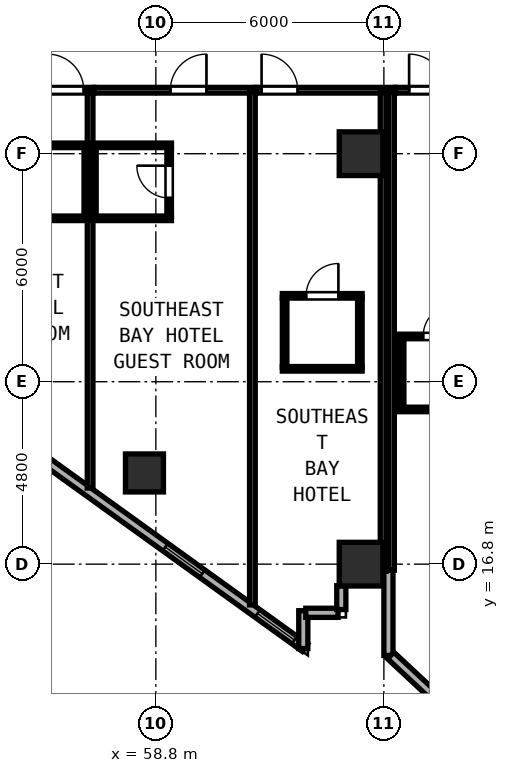
"""IFC4 building model, lengths in metres.
Left out: names, types, materials, properties, quantities, classifications, styles, units other than length and angle.
Written with IfcOpenShell. Run it as: python <this file> out.ifc"""

import sys

from ifc_helpers import new_model, si_unit, direction, frame, frame_2d, origin, origin_2d, place, context, subcontext, project, spatial, rectangle, hollow_rectangle, extrude, element, fill, save


model = new_model("IFC4")
c1 = context("Model", 3, precision=1e-05, world=origin(), true_north=direction((0.0, 1.0)))
c2 = subcontext(c1, "Body", "Model", "MODEL_VIEW")
j1 = project(units=[si_unit("LENGTHUNIT", "METRE"), si_unit("PLANEANGLEUNIT", "RADIAN")], contexts=[c1])
p1 = place(None, origin())
s1 = spatial("IfcSite", under=j1, at=p1, CompositionType="ELEMENT")
p2 = place(p1, origin())
s2 = spatial("IfcBuilding", under=s1, at=p2, CompositionType="ELEMENT")
p3 = place(p2, frame((0.0, 0.0, 62.8)))
s3 = spatial("IfcBuildingStorey", under=s2, at=p3, CompositionType="ELEMENT", Elevation=62.8)
for number, where, z_axis, x_axis in (
    (1, (64.2, 16.8, 0.0), (0.0, 0.0, 1.0), (1.0, 0.0, 0.0)),
    (2, (64.2, 27.6, 0.0), (0.0, 0.0, 1.0), (1.0, 0.0, 0.0)),
):
    element("IfcColumn", number, at=place(p3, frame(where, z_axis=z_axis, x_axis=x_axis)), inside=s3, PredefinedType="COLUMN", context=c2, shape_type="SweptSolid", body=[
        extrude(hollow_rectangle(XDim=1.15, YDim=1.15, WallThickness=0.042, at=origin_2d()), origin(), (0.0, 0.0, 1.0), 3.8),
    ])
p4 = place(p3, frame((58.5, 19.2, 0.0), z_axis=(0.0, 0.0, 1.0), x_axis=(1.0, 0.0, 0.0)))
e3 = element("IfcColumn", 3, at=p4, inside=s3, PredefinedType="COLUMN", context=c2, shape_type="SweptSolid", body=[
    extrude(hollow_rectangle(XDim=1.0, YDim=1.0, WallThickness=0.038, at=origin_2d()), origin(), (0.0, 0.0, 1.0), 3.8),
])
p5 = place(p3, frame((53.367, 21.34, 0.0), z_axis=(0.0, 0.0, 1.0), x_axis=(0.811543176492, -0.58429245476, 0.0)))
e4 = element("IfcWall", 4, at=p5, inside=s3, PredefinedType="SOLIDWALL", context=c2, shape_type="SweptSolid", body=[
    extrude(rectangle(XDim=11.531, YDim=0.24, at=frame_2d((5.765, 0.0))), origin(), (0.0, 0.0, 1.0), 3.097),
])
p6 = place(p5, frame((1.6, 0.0, 0.85)))
e5 = element("IfcOpeningElement", 5, at=p6, cuts=e4, PredefinedType="OPENING", context=c2, shape_type="SweptSolid", body=[
    extrude(rectangle(XDim=1.2, YDim=1.85, at=frame_2d((0.6, 0.925))), frame((0.0, 0.13, 0.0), z_axis=(0.0, -1.0, 0.0), x_axis=(1.0, 0.0, 0.0)), (0.0, 0.0, 1.0), 0.26),
])
p7 = place(p5, frame((7.0, 0.0, 0.85)))
e6 = element("IfcOpeningElement", 6, at=p7, cuts=e4, PredefinedType="OPENING", context=c2, shape_type="SweptSolid", body=[
    extrude(rectangle(XDim=1.2, YDim=1.85, at=frame_2d((0.6, 0.925))), frame((0.0, 0.13, 0.0), z_axis=(0.0, -1.0, 0.0), x_axis=(1.0, 0.0, 0.0)), (0.0, 0.0, 1.0), 0.26),
])
p8 = place(p5, frame((9.99, 0.0, 0.85)))
e7 = element("IfcOpeningElement", 7, at=p8, cuts=e4, PredefinedType="OPENING", context=c2, shape_type="SweptSolid", body=[
    extrude(rectangle(XDim=1.2, YDim=1.85, at=frame_2d((0.6, 0.925))), frame((0.0, 0.13, 0.0), z_axis=(0.0, -1.0, 0.0), x_axis=(1.0, 0.0, 0.0)), (0.0, 0.0, 1.0), 0.26),
])
p9 = place(p3, frame((62.68, 14.579, 0.0), z_axis=(0.0, 0.0, 1.0), x_axis=(0.0, 1.0, 0.0)))
e8 = element("IfcWall", 8, at=p9, inside=s3, PredefinedType="SOLIDWALL", context=c2, shape_type="SweptSolid", body=[
    extrude(rectangle(XDim=0.996, YDim=0.24, at=frame_2d((0.498, 0.0))), origin(), (0.0, 0.0, 1.0), 3.6),
])
p10 = place(p3, frame((62.745, 15.52, 0.0), z_axis=(0.0, 0.0, 1.0), x_axis=(1.0, 0.0, 0.0)))
e9 = element("IfcWall", 9, at=p10, inside=s3, PredefinedType="SOLIDWALL", context=c2, shape_type="SweptSolid", body=[
    extrude(rectangle(XDim=0.85, YDim=0.24, at=frame_2d((0.425, 0.0))), origin(), (0.0, 0.0, 1.0), 3.6),
])
p11 = place(p3, frame((63.68, 15.605, 0.0), z_axis=(0.0, 0.0, 1.0), x_axis=(0.0, 1.0, 0.0)))
e10 = element("IfcWall", 10, at=p11, inside=s3, PredefinedType="SOLIDWALL", context=c2, shape_type="SweptSolid", body=[
    extrude(rectangle(XDim=0.628, YDim=0.24, at=frame_2d((0.314, 0.0))), origin(), (0.0, 0.0, 1.0), 3.6),
])
p12 = place(p3, frame((64.92, 16.64, 0.0), z_axis=(0.0, 0.0, 1.0), x_axis=(0.0, -1.0, 0.0)))
e11 = element("IfcWall", 11, at=p12, inside=s3, PredefinedType="SOLIDWALL", context=c2, shape_type="SweptSolid", body=[
    extrude(rectangle(XDim=2.243, YDim=0.24, at=frame_2d((1.121, 0.0))), origin(), (0.0, 0.0, 1.0), 3.6),
])
p13 = place(p3, frame((64.979, 14.397, 0.0), z_axis=(0.0, 0.0, 1.0), x_axis=(0.731053894258, -0.682319722484, 0.0)))
e12 = element("IfcWall", 12, at=p13, inside=s3, PredefinedType="SOLIDWALL", context=c2, shape_type="SweptSolid", body=[
    extrude(rectangle(XDim=11.818, YDim=0.24, at=frame_2d((5.909, 0.0))), origin(), (0.0, 0.0, 1.0), 3.6),
])
p14 = place(p13, frame((1.6, 0.0, 0.85)))
e13 = element("IfcOpeningElement", 13, at=p14, cuts=e12, PredefinedType="OPENING", context=c2, shape_type="SweptSolid", body=[
    extrude(rectangle(XDim=1.2, YDim=1.85, at=frame_2d((0.6, 0.925))), frame((0.0, 0.13, 0.0), z_axis=(0.0, -1.0, 0.0), x_axis=(1.0, 0.0, 0.0)), (0.0, 0.0, 1.0), 0.26),
])
p15 = place(p13, frame((7.0, 0.0, 0.85)))
e14 = element("IfcOpeningElement", 14, at=p15, cuts=e12, PredefinedType="OPENING", context=c2, shape_type="SweptSolid", body=[
    extrude(rectangle(XDim=1.2, YDim=1.85, at=frame_2d((0.6, 0.925))), frame((0.0, 0.13, 0.0), z_axis=(0.0, -1.0, 0.0), x_axis=(1.0, 0.0, 0.0)), (0.0, 0.0, 1.0), 0.26),
])
p16 = place(p3, frame((52.882, 29.27, 0.0), z_axis=(0.0, 0.0, 1.0), x_axis=(1.0, 0.0, 0.0)))
e15 = element("IfcWall", 15, at=p16, inside=s3, PredefinedType="PARTITIONING", context=c2, shape_type="SweptSolid", body=[
    extrude(rectangle(XDim=4.288, YDim=0.15, at=frame_2d((2.144, 0.0))), origin(), (0.0, 0.0, 1.0), 3.6),
])
p17 = place(p16, frame((4.02, 0.0, 0.0), z_axis=(0.0, 0.0, 1.0), x_axis=(-1.0, 0.0, 0.0)))
e16 = element("IfcOpeningElement", 16, at=p17, cuts=e15, PredefinedType="OPENING", context=c2, shape_type="SweptSolid", body=[
    extrude(rectangle(XDim=0.95, YDim=2.15, at=frame_2d((0.475, 1.075))), frame((0.0, 0.085, 0.0), z_axis=(0.0, -1.0, 0.0), x_axis=(1.0, 0.0, 0.0)), (0.0, 0.0, 1.0), 0.17),
])
p18 = place(p3, frame((57.07, 18.803, 0.0), z_axis=(0.0, 0.0, 1.0), x_axis=(0.0, 1.0, 0.0)))
e17 = element("IfcWall", 17, at=p18, inside=s3, PredefinedType="PARTITIONING", context=c2, shape_type="SweptSolid", body=[
    extrude(rectangle(XDim=10.407, YDim=0.15, at=frame_2d((5.204, 0.0))), origin(), (0.0, 0.0, 1.0), 3.6),
])
p19 = place(p3, frame((54.93, 27.82, 0.0), z_axis=(0.0, 0.0, 1.0), x_axis=(1.0, 0.0, 0.0)))
e18 = element("IfcWall", 18, at=p19, inside=s3, PredefinedType="PARTITIONING", context=c2, shape_type="SweptSolid", body=[
    extrude(rectangle(XDim=2.08, YDim=0.12, at=frame_2d((1.04, 0.0))), origin(), (0.0, 0.0, 1.0), 3.097),
])
p20 = place(p3, frame((54.93, 25.9, 0.0), z_axis=(0.0, 0.0, 1.0), x_axis=(1.0, 0.0, 0.0)))
e19 = element("IfcWall", 19, at=p20, inside=s3, PredefinedType="PARTITIONING", context=c2, shape_type="SweptSolid", body=[
    extrude(rectangle(XDim=2.08, YDim=0.12, at=frame_2d((1.04, 0.0))), origin(), (0.0, 0.0, 1.0), 3.6),
])
p21 = place(p3, frame((56.97, 25.945, 0.0), z_axis=(0.0, 0.0, 1.0), x_axis=(0.0, 1.0, 0.0)))
e20 = element("IfcWall", 20, at=p21, inside=s3, PredefinedType="PARTITIONING", context=c2, shape_type="SweptSolid", body=[
    extrude(rectangle(XDim=1.83, YDim=0.12, at=frame_2d((0.915, 0.0))), origin(), (0.0, 0.0, 1.0), 3.6),
])
p22 = place(p3, frame((57.172, 29.27, 0.0), z_axis=(0.0, 0.0, 1.0), x_axis=(1.0, 0.0, 0.0)))
e21 = element("IfcWall", 21, at=p22, inside=s3, PredefinedType="PARTITIONING", context=c2, shape_type="SweptSolid", body=[
    extrude(rectangle(XDim=4.268, YDim=0.15, at=frame_2d((2.134, 0.0))), origin(), (0.0, 0.0, 1.0), 3.6),
])
p23 = place(p22, frame((2.959, 0.0, 0.0), z_axis=(0.0, 0.0, 1.0), x_axis=(-1.0, 0.0, 0.0)))
e22 = element("IfcOpeningElement", 22, at=p23, cuts=e21, PredefinedType="OPENING", context=c2, shape_type="SweptSolid", body=[
    extrude(rectangle(XDim=0.95, YDim=2.15, at=frame_2d((0.475, 1.075))), frame((0.0, 0.085, 0.0), z_axis=(0.0, -1.0, 0.0), x_axis=(1.0, 0.0, 0.0)), (0.0, 0.0, 1.0), 0.17),
])
p24 = place(p3, frame((61.34, 15.729, 0.0), z_axis=(0.0, 0.0, 1.0), x_axis=(0.0, 1.0, 0.0)))
e23 = element("IfcWall", 23, at=p24, inside=s3, PredefinedType="PARTITIONING", context=c2, shape_type="SweptSolid", body=[
    extrude(rectangle(XDim=13.481, YDim=0.15, at=frame_2d((6.741, 0.0))), origin(), (0.0, 0.0, 1.0), 3.6),
])
p25 = place(p3, frame((57.13, 27.82, 0.0), z_axis=(0.0, 0.0, 1.0), x_axis=(1.0, 0.0, 0.0)))
e24 = element("IfcWall", 24, at=p25, inside=s3, PredefinedType="PARTITIONING", context=c2, shape_type="SweptSolid", body=[
    extrude(rectangle(XDim=2.08, YDim=0.12, at=frame_2d((1.04, 0.0))), origin(), (0.0, 0.0, 1.0), 3.097),
])
p26 = place(p3, frame((57.13, 25.9, 0.0), z_axis=(0.0, 0.0, 1.0), x_axis=(1.0, 0.0, 0.0)))
e25 = element("IfcWall", 25, at=p26, inside=s3, PredefinedType="PARTITIONING", context=c2, shape_type="SweptSolid", body=[
    extrude(rectangle(XDim=2.08, YDim=0.12, at=frame_2d((1.04, 0.0))), origin(), (0.0, 0.0, 1.0), 3.6),
])
p27 = place(p3, frame((57.17, 25.945, 0.0), z_axis=(0.0, 0.0, 1.0), x_axis=(0.0, 1.0, 0.0)))
e26 = element("IfcWall", 26, at=p27, inside=s3, PredefinedType="PARTITIONING", context=c2, shape_type="SweptSolid", body=[
    extrude(rectangle(XDim=1.83, YDim=0.12, at=frame_2d((0.915, 0.0))), origin(), (0.0, 0.0, 1.0), 3.6),
])
p28 = place(p3, frame((59.15, 25.945, 0.0), z_axis=(0.0, 0.0, 1.0), x_axis=(0.0, 1.0, 0.0)))
e27 = element("IfcWall", 27, at=p28, inside=s3, PredefinedType="PARTITIONING", context=c2, shape_type="SweptSolid", body=[
    extrude(rectangle(XDim=1.83, YDim=0.12, at=frame_2d((0.915, 0.0))), origin(), (0.0, 0.0, 1.0), 3.6),
])
p29 = place(p28, frame((0.49, 0.0, 0.0)))
e28 = element("IfcOpeningElement", 28, at=p29, cuts=e27, PredefinedType="OPENING", context=c2, shape_type="SweptSolid", body=[
    extrude(rectangle(XDim=0.85, YDim=2.1, at=frame_2d((0.425, 1.05))), frame((0.0, 0.07, 0.0), z_axis=(0.0, -1.0, 0.0), x_axis=(1.0, 0.0, 0.0)), (0.0, 0.0, 1.0), 0.14),
])
p30 = place(p3, frame((61.442, 29.27, 0.0), z_axis=(0.0, 0.0, 1.0), x_axis=(1.0, 0.0, 0.0)))
e29 = element("IfcWall", 29, at=p30, inside=s3, PredefinedType="PARTITIONING", context=c2, shape_type="SweptSolid", body=[
    extrude(rectangle(XDim=3.658, YDim=0.15, at=frame_2d((1.829, 0.0))), origin(), (0.0, 0.0, 1.0), 3.6),
])
p31 = place(p30, frame((1.09, 0.0, 0.0), z_axis=(0.0, 0.0, 1.0), x_axis=(-1.0, 0.0, 0.0)))
e30 = element("IfcOpeningElement", 30, at=p31, cuts=e29, PredefinedType="OPENING", context=c2, shape_type="SweptSolid", body=[
    extrude(rectangle(XDim=0.95, YDim=2.15, at=frame_2d((0.475, 1.075))), frame((0.0, 0.085, 0.0), z_axis=(0.0, -1.0, 0.0), x_axis=(1.0, 0.0, 0.0)), (0.0, 0.0, 1.0), 0.17),
])
p32 = place(p3, frame((65.0, 16.642, 0.0), z_axis=(0.0, 0.0, 1.0), x_axis=(0.0, 1.0, 0.0)))
e31 = element("IfcWall", 31, at=p32, inside=s3, PredefinedType="PARTITIONING", context=c2, shape_type="SweptSolid", body=[
    extrude(rectangle(XDim=12.568, YDim=0.15, at=frame_2d((6.284, 0.0))), origin(), (0.0, 0.0, 1.0), 3.6),
])
p33 = place(p3, frame((62.128, 23.86, 0.0), z_axis=(0.0, 0.0, 1.0), x_axis=(1.0, 0.0, 0.0)))
e32 = element("IfcWall", 32, at=p33, inside=s3, PredefinedType="PARTITIONING", context=c2, shape_type="SweptSolid", body=[
    extrude(rectangle(XDim=2.1, YDim=0.12, at=frame_2d((1.05, 0.0))), origin(), (0.0, 0.0, 1.0), 3.6),
])
p34 = place(p33, frame((1.475, 0.0, 0.0), z_axis=(0.0, 0.0, 1.0), x_axis=(-1.0, 0.0, 0.0)))
e33 = element("IfcOpeningElement", 33, at=p34, cuts=e32, PredefinedType="OPENING", context=c2, shape_type="SweptSolid", body=[
    extrude(rectangle(XDim=0.85, YDim=2.1, at=frame_2d((0.425, 1.05))), frame((0.0, 0.07, 0.0), z_axis=(0.0, -1.0, 0.0), x_axis=(1.0, 0.0, 0.0)), (0.0, 0.0, 1.0), 0.14),
])
p35 = place(p3, frame((62.128, 21.94, 0.0), z_axis=(0.0, 0.0, 1.0), x_axis=(1.0, 0.0, 0.0)))
e34 = element("IfcWall", 34, at=p35, inside=s3, PredefinedType="PARTITIONING", context=c2, shape_type="SweptSolid", body=[
    extrude(rectangle(XDim=2.1, YDim=0.12, at=frame_2d((1.05, 0.0))), origin(), (0.0, 0.0, 1.0), 3.6),
])
p36 = place(p3, frame((62.188, 21.985, 0.0), z_axis=(0.0, 0.0, 1.0), x_axis=(0.0, 1.0, 0.0)))
e35 = element("IfcWall", 35, at=p36, inside=s3, PredefinedType="PARTITIONING", context=c2, shape_type="SweptSolid", body=[
    extrude(rectangle(XDim=1.83, YDim=0.12, at=frame_2d((0.915, 0.0))), origin(), (0.0, 0.0, 1.0), 3.6),
])
p37 = place(p3, frame((64.168, 21.985, 0.0), z_axis=(0.0, 0.0, 1.0), x_axis=(0.0, 1.0, 0.0)))
e36 = element("IfcWall", 36, at=p37, inside=s3, PredefinedType="PARTITIONING", context=c2, shape_type="SweptSolid", body=[
    extrude(rectangle(XDim=1.83, YDim=0.12, at=frame_2d((0.915, 0.0))), origin(), (0.0, 0.0, 1.0), 3.097),
])
p38 = place(p3, frame((65.102, 29.27, 0.0), z_axis=(0.0, 0.0, 1.0), x_axis=(1.0, 0.0, 0.0)))
e37 = element("IfcWall", 37, at=p38, inside=s3, PredefinedType="PARTITIONING", context=c2, shape_type="SweptSolid", body=[
    extrude(rectangle(XDim=2.498, YDim=0.15, at=frame_2d((1.249, 0.0))), origin(), (0.0, 0.0, 1.0), 3.6),
])
p39 = place(p38, frame((1.312, 0.0, 0.0), z_axis=(0.0, 0.0, 1.0), x_axis=(-1.0, 0.0, 0.0)))
e38 = element("IfcOpeningElement", 38, at=p39, cuts=e37, PredefinedType="OPENING", context=c2, shape_type="SweptSolid", body=[
    extrude(rectangle(XDim=0.95, YDim=2.15, at=frame_2d((0.475, 1.075))), frame((0.0, 0.085, 0.0), z_axis=(0.0, -1.0, 0.0), x_axis=(1.0, 0.0, 0.0)), (0.0, 0.0, 1.0), 0.17),
])
p40 = place(p3, frame((64.78, 16.612, 0.0), z_axis=(0.0, 0.0, 1.0), x_axis=(0.0, 1.0, 0.0)))
e39 = element("IfcWall", 39, at=p40, inside=s3, PredefinedType="PARTITIONING", context=c2, shape_type="SweptSolid", body=[
    extrude(rectangle(XDim=12.598, YDim=0.15, at=frame_2d((6.299, 0.0))), origin(), (0.0, 0.0, 1.0), 3.6),
])
p41 = place(p3, frame((65.207, 22.791, 0.0), z_axis=(0.0, 0.0, 1.0), x_axis=(1.0, 0.0, 0.0)))
e40 = element("IfcWall", 40, at=p41, inside=s3, PredefinedType="PARTITIONING", context=c2, shape_type="SweptSolid", body=[
    extrude(rectangle(XDim=2.1, YDim=0.12, at=frame_2d((1.05, 0.0))), origin(), (0.0, 0.0, 1.0), 3.6),
])
p42 = place(p41, frame((1.475, 0.0, 0.0), z_axis=(0.0, 0.0, 1.0), x_axis=(-1.0, 0.0, 0.0)))
e41 = element("IfcOpeningElement", 41, at=p42, cuts=e40, PredefinedType="OPENING", context=c2, shape_type="SweptSolid", body=[
    extrude(rectangle(XDim=0.85, YDim=2.1, at=frame_2d((0.425, 1.05))), frame((0.0, 0.07, 0.0), z_axis=(0.0, -1.0, 0.0), x_axis=(1.0, 0.0, 0.0)), (0.0, 0.0, 1.0), 0.14),
])
p43 = place(p3, frame((65.207, 20.871, 0.0), z_axis=(0.0, 0.0, 1.0), x_axis=(1.0, 0.0, 0.0)))
e42 = element("IfcWall", 42, at=p43, inside=s3, PredefinedType="PARTITIONING", context=c2, shape_type="SweptSolid", body=[
    extrude(rectangle(XDim=2.1, YDim=0.12, at=frame_2d((1.05, 0.0))), origin(), (0.0, 0.0, 1.0), 3.6),
])
p44 = place(p3, frame((65.267, 20.916, 0.0), z_axis=(0.0, 0.0, 1.0), x_axis=(0.0, 1.0, 0.0)))
e43 = element("IfcWall", 43, at=p44, inside=s3, PredefinedType="PARTITIONING", context=c2, shape_type="SweptSolid", body=[
    extrude(rectangle(XDim=1.83, YDim=0.12, at=frame_2d((0.915, 0.0))), origin(), (0.0, 0.0, 1.0), 3.6),
])
p45 = place(p7, origin())
e44 = element("IfcWindow", 44, at=p45, inside=s3, PartitioningType="SINGLE_PANEL", PredefinedType="WINDOW", context=c2, shape_type="SweptSolid", body=[
    extrude(rectangle(XDim=1.2, YDim=1.85, at=frame_2d((0.6, 0.925))), frame((0.0, 0.03, 0.0), z_axis=(0.0, -1.0, 0.0), x_axis=(1.0, 0.0, 0.0)), (0.0, 0.0, 1.0), 0.06),
])
fill(e6, e44)
p46 = place(p17, origin())
e45 = element("IfcDoor", 45, at=p46, inside=s3, OperationType="SINGLE_SWING_RIGHT", PredefinedType="DOOR", context=c2, shape_type="SweptSolid", body=[
    extrude(rectangle(XDim=0.95, YDim=2.15, at=frame_2d((0.475, 1.075))), frame((0.0, 0.025, 0.0), z_axis=(0.0, -1.0, 0.0), x_axis=(1.0, 0.0, 0.0)), (0.0, 0.0, 1.0), 0.05),
])
fill(e16, e45)
p47 = place(p23, origin())
e46 = element("IfcDoor", 46, at=p47, inside=s3, OperationType="SINGLE_SWING_LEFT", PredefinedType="DOOR", context=c2, shape_type="SweptSolid", body=[
    extrude(rectangle(XDim=0.95, YDim=2.15, at=frame_2d((0.475, 1.075))), frame((0.0, 0.025, 0.0), z_axis=(0.0, -1.0, 0.0), x_axis=(1.0, 0.0, 0.0)), (0.0, 0.0, 1.0), 0.05),
])
fill(e22, e46)
p48 = place(p29, origin())
e47 = element("IfcDoor", 47, at=p48, inside=s3, OperationType="SINGLE_SWING_RIGHT", PredefinedType="DOOR", context=c2, shape_type="SweptSolid", body=[
    extrude(rectangle(XDim=0.85, YDim=2.1, at=frame_2d((0.425, 1.05))), frame((0.0, 0.025, 0.0), z_axis=(0.0, -1.0, 0.0), x_axis=(1.0, 0.0, 0.0)), (0.0, 0.0, 1.0), 0.05),
])
fill(e28, e47)
p49 = place(p31, origin())
e48 = element("IfcDoor", 48, at=p49, inside=s3, OperationType="SINGLE_SWING_RIGHT", PredefinedType="DOOR", context=c2, shape_type="SweptSolid", body=[
    extrude(rectangle(XDim=0.95, YDim=2.15, at=frame_2d((0.475, 1.075))), frame((0.0, 0.025, 0.0), z_axis=(0.0, -1.0, 0.0), x_axis=(1.0, 0.0, 0.0)), (0.0, 0.0, 1.0), 0.05),
])
fill(e30, e48)
p50 = place(p34, origin())
e49 = element("IfcDoor", 49, at=p50, inside=s3, OperationType="SINGLE_SWING_LEFT", PredefinedType="DOOR", context=c2, shape_type="SweptSolid", body=[
    extrude(rectangle(XDim=0.85, YDim=2.1, at=frame_2d((0.425, 1.05))), frame((0.0, 0.025, 0.0), z_axis=(0.0, -1.0, 0.0), x_axis=(1.0, 0.0, 0.0)), (0.0, 0.0, 1.0), 0.05),
])
fill(e33, e49)
p51 = place(p39, origin())
e50 = element("IfcDoor", 50, at=p51, inside=s3, OperationType="SINGLE_SWING_RIGHT", PredefinedType="DOOR", context=c2, shape_type="SweptSolid", body=[
    extrude(rectangle(XDim=0.95, YDim=2.15, at=frame_2d((0.475, 1.075))), frame((0.0, 0.025, 0.0), z_axis=(0.0, -1.0, 0.0), x_axis=(1.0, 0.0, 0.0)), (0.0, 0.0, 1.0), 0.05),
])
fill(e38, e50)
p52 = place(p42, origin())
e51 = element("IfcDoor", 51, at=p52, inside=s3, OperationType="SINGLE_SWING_LEFT", PredefinedType="DOOR", context=c2, shape_type="SweptSolid", body=[
    extrude(rectangle(XDim=0.85, YDim=2.1, at=frame_2d((0.425, 1.05))), frame((0.0, 0.025, 0.0), z_axis=(0.0, -1.0, 0.0), x_axis=(1.0, 0.0, 0.0)), (0.0, 0.0, 1.0), 0.05),
])
fill(e41, e51)
p53 = place(p8, origin())
e52 = element("IfcWindow", 52, at=p53, inside=s3, PartitioningType="SINGLE_PANEL", PredefinedType="WINDOW", context=c2, shape_type="SweptSolid", body=[
    extrude(rectangle(XDim=1.2, YDim=1.85, at=frame_2d((0.6, 0.925))), frame((0.0, 0.03, 0.0), z_axis=(0.0, -1.0, 0.0), x_axis=(1.0, 0.0, 0.0)), (0.0, 0.0, 1.0), 0.06),
])
fill(e7, e52)
save(model, sys.argv[1])
